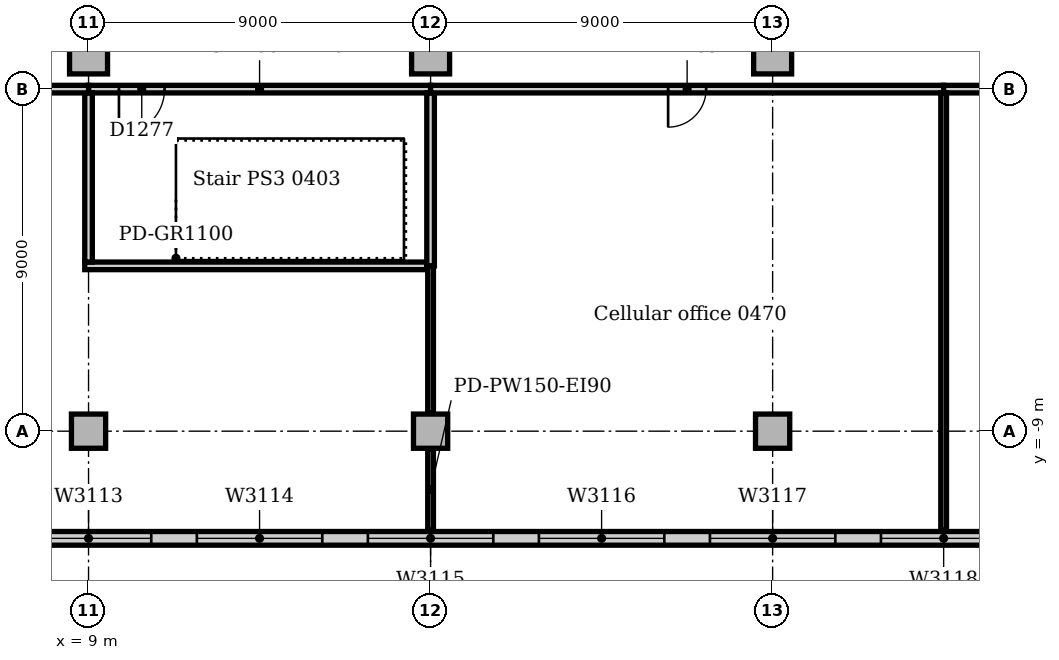
"""IFC4 building model, lengths in metres.
Left out: names, types, materials, properties, quantities, classifications, styles, units other than length and angle.
Written with IfcOpenShell. Run it as: python <this file> out.ifc"""

import sys

from ifc_helpers import new_model, si_unit, direction, frame, frame_2d, origin, origin_with_axes, origin_2d, place, context, subcontext, project, spatial, rectangle, extrude, element, fill, save


model = new_model("IFC4")
c1 = context("Model", 3, precision=1e-05, world=origin(), true_north=direction((0.0, 1.0)))
c2 = subcontext(c1, "Body", "Model", "MODEL_VIEW")
j1 = project(units=[si_unit("LENGTHUNIT", "METRE"), si_unit("PLANEANGLEUNIT", "RADIAN")], contexts=[c1])
p1 = place(None, origin())
s1 = spatial("IfcSite", under=j1, at=p1, CompositionType="ELEMENT")
p2 = place(p1, origin())
s2 = spatial("IfcBuilding", under=s1, at=p2, CompositionType="ELEMENT")
p3 = place(p2, frame((0.0, 0.0, 21.0)))
s3 = spatial("IfcBuildingStorey", under=s2, at=p3, CompositionType="ELEMENT", Elevation=21.0)
for number, where, z_axis, x_axis in (
    (1, (9.0, 0.9, 0.0), (0.0, 0.0, 1.0), (1.0, 0.0, 0.0)),
    (2, (18.0, 0.9, 0.0), (0.0, 0.0, 1.0), (1.0, 0.0, 0.0)),
    (3, (27.0, 0.9, 0.0), (0.0, 0.0, 1.0), (1.0, 0.0, 0.0)),
):
    element("IfcColumn", number, at=place(p3, frame(where, z_axis=z_axis, x_axis=x_axis)), inside=s3, PredefinedType="COLUMN", context=c2, shape_type="SweptSolid", body=[
        extrude(rectangle(XDim=1.0, YDim=1.0, at=origin_2d()), origin(), (0.0, 0.0, 1.0), 4.85),
    ])
for number, where, z_axis, x_axis in (
    (4, (9.0, -9.0, 0.0), (0.0, 0.0, 1.0), (1.0, 0.0, 0.0)),
    (5, (18.0, -9.0, 0.0), (0.0, 0.0, 1.0), (1.0, 0.0, 0.0)),
    (6, (27.0, -9.0, 0.0), (0.0, 0.0, 1.0), (1.0, 0.0, 0.0)),
):
    element("IfcColumn", number, at=place(p3, frame(where, z_axis=z_axis, x_axis=x_axis)), inside=s3, PredefinedType="COLUMN", context=c2, shape_type="SweptSolid", body=[
        extrude(rectangle(XDim=0.9, YDim=0.9, at=origin_2d()), origin(), (0.0, 0.0, 1.0), 4.7),
    ])
p4 = place(p3, frame((-81.0, -11.82, 0.0), z_axis=(0.0, 0.0, 1.0), x_axis=(1.0, 0.0, 0.0)))
e7 = element("IfcWall", 7, at=p4, inside=s3, PredefinedType="STANDARD", context=c2, shape_type="SweptSolid", body=[
    extrude(rectangle(XDim=144.0, YDim=0.36, at=frame_2d((72.0, 0.0))), origin(), (0.0, 0.0, 1.0), 4.85),
])
p5 = place(p4, frame((2.85, 0.0, 0.9)))
e8 = element("IfcOpeningElement", 8, at=p5, cuts=e7, PredefinedType="OPENING", context=c2, shape_type="SweptSolid", body=[
    extrude(rectangle(XDim=3.3, YDim=2.4, at=frame_2d((1.65, 1.2))), frame((0.0, 0.19, 0.0), z_axis=(0.0, -1.0, 0.0), x_axis=(1.0, 0.0, 0.0)), (0.0, 0.0, 1.0), 0.38),
])
p6 = place(p4, frame((7.35, 0.0, 0.9)))
e9 = element("IfcOpeningElement", 9, at=p6, cuts=e7, PredefinedType="OPENING", context=c2, shape_type="SweptSolid", body=[
    extrude(rectangle(XDim=3.3, YDim=2.4, at=frame_2d((1.65, 1.2))), frame((0.0, 0.19, 0.0), z_axis=(0.0, -1.0, 0.0), x_axis=(1.0, 0.0, 0.0)), (0.0, 0.0, 1.0), 0.38),
])
p7 = place(p4, frame((11.85, 0.0, 0.9)))
e10 = element("IfcOpeningElement", 10, at=p7, cuts=e7, PredefinedType="OPENING", context=c2, shape_type="SweptSolid", body=[
    extrude(rectangle(XDim=3.3, YDim=2.4, at=frame_2d((1.65, 1.2))), frame((0.0, 0.19, 0.0), z_axis=(0.0, -1.0, 0.0), x_axis=(1.0, 0.0, 0.0)), (0.0, 0.0, 1.0), 0.38),
])
p8 = place(p4, frame((16.35, 0.0, 0.9)))
e11 = element("IfcOpeningElement", 11, at=p8, cuts=e7, PredefinedType="OPENING", context=c2, shape_type="SweptSolid", body=[
    extrude(rectangle(XDim=3.3, YDim=2.4, at=frame_2d((1.65, 1.2))), frame((0.0, 0.19, 0.0), z_axis=(0.0, -1.0, 0.0), x_axis=(1.0, 0.0, 0.0)), (0.0, 0.0, 1.0), 0.38),
])
p9 = place(p4, frame((20.85, 0.0, 0.9)))
e12 = element("IfcOpeningElement", 12, at=p9, cuts=e7, PredefinedType="OPENING", context=c2, shape_type="SweptSolid", body=[
    extrude(rectangle(XDim=3.3, YDim=2.4, at=frame_2d((1.65, 1.2))), frame((0.0, 0.19, 0.0), z_axis=(0.0, -1.0, 0.0), x_axis=(1.0, 0.0, 0.0)), (0.0, 0.0, 1.0), 0.38),
])
p10 = place(p4, frame((25.35, 0.0, 0.9)))
e13 = element("IfcOpeningElement", 13, at=p10, cuts=e7, PredefinedType="OPENING", context=c2, shape_type="SweptSolid", body=[
    extrude(rectangle(XDim=3.3, YDim=2.4, at=frame_2d((1.65, 1.2))), frame((0.0, 0.19, 0.0), z_axis=(0.0, -1.0, 0.0), x_axis=(1.0, 0.0, 0.0)), (0.0, 0.0, 1.0), 0.38),
])
p11 = place(p4, frame((29.85, 0.0, 0.9)))
e14 = element("IfcOpeningElement", 14, at=p11, cuts=e7, PredefinedType="OPENING", context=c2, shape_type="SweptSolid", body=[
    extrude(rectangle(XDim=3.3, YDim=2.4, at=frame_2d((1.65, 1.2))), frame((0.0, 0.19, 0.0), z_axis=(0.0, -1.0, 0.0), x_axis=(1.0, 0.0, 0.0)), (0.0, 0.0, 1.0), 0.38),
])
p12 = place(p4, frame((34.35, 0.0, 0.9)))
e15 = element("IfcOpeningElement", 15, at=p12, cuts=e7, PredefinedType="OPENING", context=c2, shape_type="SweptSolid", body=[
    extrude(rectangle(XDim=3.3, YDim=2.4, at=frame_2d((1.65, 1.2))), frame((0.0, 0.19, 0.0), z_axis=(0.0, -1.0, 0.0), x_axis=(1.0, 0.0, 0.0)), (0.0, 0.0, 1.0), 0.38),
])
p13 = place(p4, frame((38.85, 0.0, 0.9)))
e16 = element("IfcOpeningElement", 16, at=p13, cuts=e7, PredefinedType="OPENING", context=c2, shape_type="SweptSolid", body=[
    extrude(rectangle(XDim=3.3, YDim=2.4, at=frame_2d((1.65, 1.2))), frame((0.0, 0.19, 0.0), z_axis=(0.0, -1.0, 0.0), x_axis=(1.0, 0.0, 0.0)), (0.0, 0.0, 1.0), 0.38),
])
p14 = place(p4, frame((43.35, 0.0, 0.9)))
e17 = element("IfcOpeningElement", 17, at=p14, cuts=e7, PredefinedType="OPENING", context=c2, shape_type="SweptSolid", body=[
    extrude(rectangle(XDim=3.3, YDim=2.4, at=frame_2d((1.65, 1.2))), frame((0.0, 0.19, 0.0), z_axis=(0.0, -1.0, 0.0), x_axis=(1.0, 0.0, 0.0)), (0.0, 0.0, 1.0), 0.38),
])
p15 = place(p4, frame((47.85, 0.0, 0.9)))
e18 = element("IfcOpeningElement", 18, at=p15, cuts=e7, PredefinedType="OPENING", context=c2, shape_type="SweptSolid", body=[
    extrude(rectangle(XDim=3.3, YDim=2.4, at=frame_2d((1.65, 1.2))), frame((0.0, 0.19, 0.0), z_axis=(0.0, -1.0, 0.0), x_axis=(1.0, 0.0, 0.0)), (0.0, 0.0, 1.0), 0.38),
])
p16 = place(p4, frame((52.35, 0.0, 0.9)))
e19 = element("IfcOpeningElement", 19, at=p16, cuts=e7, PredefinedType="OPENING", context=c2, shape_type="SweptSolid", body=[
    extrude(rectangle(XDim=3.3, YDim=2.4, at=frame_2d((1.65, 1.2))), frame((0.0, 0.19, 0.0), z_axis=(0.0, -1.0, 0.0), x_axis=(1.0, 0.0, 0.0)), (0.0, 0.0, 1.0), 0.38),
])
p17 = place(p4, frame((56.85, 0.0, 0.9)))
e20 = element("IfcOpeningElement", 20, at=p17, cuts=e7, PredefinedType="OPENING", context=c2, shape_type="SweptSolid", body=[
    extrude(rectangle(XDim=3.3, YDim=2.4, at=frame_2d((1.65, 1.2))), frame((0.0, 0.19, 0.0), z_axis=(0.0, -1.0, 0.0), x_axis=(1.0, 0.0, 0.0)), (0.0, 0.0, 1.0), 0.38),
])
p18 = place(p4, frame((61.35, 0.0, 0.9)))
e21 = element("IfcOpeningElement", 21, at=p18, cuts=e7, PredefinedType="OPENING", context=c2, shape_type="SweptSolid", body=[
    extrude(rectangle(XDim=3.3, YDim=2.4, at=frame_2d((1.65, 1.2))), frame((0.0, 0.19, 0.0), z_axis=(0.0, -1.0, 0.0), x_axis=(1.0, 0.0, 0.0)), (0.0, 0.0, 1.0), 0.38),
])
p19 = place(p4, frame((65.85, 0.0, 0.9)))
e22 = element("IfcOpeningElement", 22, at=p19, cuts=e7, PredefinedType="OPENING", context=c2, shape_type="SweptSolid", body=[
    extrude(rectangle(XDim=3.3, YDim=2.4, at=frame_2d((1.65, 1.2))), frame((0.0, 0.19, 0.0), z_axis=(0.0, -1.0, 0.0), x_axis=(1.0, 0.0, 0.0)), (0.0, 0.0, 1.0), 0.38),
])
p20 = place(p4, frame((70.35, 0.0, 0.9)))
e23 = element("IfcOpeningElement", 23, at=p20, cuts=e7, PredefinedType="OPENING", context=c2, shape_type="SweptSolid", body=[
    extrude(rectangle(XDim=3.3, YDim=2.4, at=frame_2d((1.65, 1.2))), frame((0.0, 0.19, 0.0), z_axis=(0.0, -1.0, 0.0), x_axis=(1.0, 0.0, 0.0)), (0.0, 0.0, 1.0), 0.38),
])
p21 = place(p4, frame((74.85, 0.0, 0.9)))
e24 = element("IfcOpeningElement", 24, at=p21, cuts=e7, PredefinedType="OPENING", context=c2, shape_type="SweptSolid", body=[
    extrude(rectangle(XDim=3.3, YDim=2.4, at=frame_2d((1.65, 1.2))), frame((0.0, 0.19, 0.0), z_axis=(0.0, -1.0, 0.0), x_axis=(1.0, 0.0, 0.0)), (0.0, 0.0, 1.0), 0.38),
])
p22 = place(p4, frame((79.35, 0.0, 0.9)))
e25 = element("IfcOpeningElement", 25, at=p22, cuts=e7, PredefinedType="OPENING", context=c2, shape_type="SweptSolid", body=[
    extrude(rectangle(XDim=3.3, YDim=2.4, at=frame_2d((1.65, 1.2))), frame((0.0, 0.19, 0.0), z_axis=(0.0, -1.0, 0.0), x_axis=(1.0, 0.0, 0.0)), (0.0, 0.0, 1.0), 0.38),
])
p23 = place(p4, frame((83.85, 0.0, 0.9)))
e26 = element("IfcOpeningElement", 26, at=p23, cuts=e7, PredefinedType="OPENING", context=c2, shape_type="SweptSolid", body=[
    extrude(rectangle(XDim=3.3, YDim=2.4, at=frame_2d((1.65, 1.2))), frame((0.0, 0.19, 0.0), z_axis=(0.0, -1.0, 0.0), x_axis=(1.0, 0.0, 0.0)), (0.0, 0.0, 1.0), 0.38),
])
p24 = place(p4, frame((88.35, 0.0, 0.9)))
e27 = element("IfcOpeningElement", 27, at=p24, cuts=e7, PredefinedType="OPENING", context=c2, shape_type="SweptSolid", body=[
    extrude(rectangle(XDim=3.3, YDim=2.4, at=frame_2d((1.65, 1.2))), frame((0.0, 0.19, 0.0), z_axis=(0.0, -1.0, 0.0), x_axis=(1.0, 0.0, 0.0)), (0.0, 0.0, 1.0), 0.38),
])
p25 = place(p4, frame((92.85, 0.0, 0.9)))
e28 = element("IfcOpeningElement", 28, at=p25, cuts=e7, PredefinedType="OPENING", context=c2, shape_type="SweptSolid", body=[
    extrude(rectangle(XDim=3.3, YDim=2.4, at=frame_2d((1.65, 1.2))), frame((0.0, 0.19, 0.0), z_axis=(0.0, -1.0, 0.0), x_axis=(1.0, 0.0, 0.0)), (0.0, 0.0, 1.0), 0.38),
])
p26 = place(p4, frame((97.35, 0.0, 0.9)))
e29 = element("IfcOpeningElement", 29, at=p26, cuts=e7, PredefinedType="OPENING", context=c2, shape_type="SweptSolid", body=[
    extrude(rectangle(XDim=3.3, YDim=2.4, at=frame_2d((1.65, 1.2))), frame((0.0, 0.19, 0.0), z_axis=(0.0, -1.0, 0.0), x_axis=(1.0, 0.0, 0.0)), (0.0, 0.0, 1.0), 0.38),
])
p27 = place(p4, frame((101.85, 0.0, 0.9)))
e30 = element("IfcOpeningElement", 30, at=p27, cuts=e7, PredefinedType="OPENING", context=c2, shape_type="SweptSolid", body=[
    extrude(rectangle(XDim=3.3, YDim=2.4, at=frame_2d((1.65, 1.2))), frame((0.0, 0.19, 0.0), z_axis=(0.0, -1.0, 0.0), x_axis=(1.0, 0.0, 0.0)), (0.0, 0.0, 1.0), 0.38),
])
p28 = place(p4, frame((106.35, 0.0, 0.9)))
e31 = element("IfcOpeningElement", 31, at=p28, cuts=e7, PredefinedType="OPENING", context=c2, shape_type="SweptSolid", body=[
    extrude(rectangle(XDim=3.3, YDim=2.4, at=frame_2d((1.65, 1.2))), frame((0.0, 0.19, 0.0), z_axis=(0.0, -1.0, 0.0), x_axis=(1.0, 0.0, 0.0)), (0.0, 0.0, 1.0), 0.38),
])
p29 = place(p4, frame((110.85, 0.0, 0.9)))
e32 = element("IfcOpeningElement", 32, at=p29, cuts=e7, PredefinedType="OPENING", context=c2, shape_type="SweptSolid", body=[
    extrude(rectangle(XDim=3.3, YDim=2.4, at=frame_2d((1.65, 1.2))), frame((0.0, 0.19, 0.0), z_axis=(0.0, -1.0, 0.0), x_axis=(1.0, 0.0, 0.0)), (0.0, 0.0, 1.0), 0.38),
])
p30 = place(p4, frame((115.35, 0.0, 0.9)))
e33 = element("IfcOpeningElement", 33, at=p30, cuts=e7, PredefinedType="OPENING", context=c2, shape_type="SweptSolid", body=[
    extrude(rectangle(XDim=3.3, YDim=2.4, at=frame_2d((1.65, 1.2))), frame((0.0, 0.19, 0.0), z_axis=(0.0, -1.0, 0.0), x_axis=(1.0, 0.0, 0.0)), (0.0, 0.0, 1.0), 0.38),
])
p31 = place(p4, frame((119.85, 0.0, 0.9)))
e34 = element("IfcOpeningElement", 34, at=p31, cuts=e7, PredefinedType="OPENING", context=c2, shape_type="SweptSolid", body=[
    extrude(rectangle(XDim=3.3, YDim=2.4, at=frame_2d((1.65, 1.2))), frame((0.0, 0.19, 0.0), z_axis=(0.0, -1.0, 0.0), x_axis=(1.0, 0.0, 0.0)), (0.0, 0.0, 1.0), 0.38),
])
p32 = place(p4, frame((124.35, 0.0, 0.9)))
e35 = element("IfcOpeningElement", 35, at=p32, cuts=e7, PredefinedType="OPENING", context=c2, shape_type="SweptSolid", body=[
    extrude(rectangle(XDim=3.3, YDim=2.4, at=frame_2d((1.65, 1.2))), frame((0.0, 0.19, 0.0), z_axis=(0.0, -1.0, 0.0), x_axis=(1.0, 0.0, 0.0)), (0.0, 0.0, 1.0), 0.38),
])
p33 = place(p4, frame((128.85, 0.0, 0.9)))
e36 = element("IfcOpeningElement", 36, at=p33, cuts=e7, PredefinedType="OPENING", context=c2, shape_type="SweptSolid", body=[
    extrude(rectangle(XDim=3.3, YDim=2.4, at=frame_2d((1.65, 1.2))), frame((0.0, 0.19, 0.0), z_axis=(0.0, -1.0, 0.0), x_axis=(1.0, 0.0, 0.0)), (0.0, 0.0, 1.0), 0.38),
])
p34 = place(p4, frame((133.35, 0.0, 0.9)))
e37 = element("IfcOpeningElement", 37, at=p34, cuts=e7, PredefinedType="OPENING", context=c2, shape_type="SweptSolid", body=[
    extrude(rectangle(XDim=3.3, YDim=2.4, at=frame_2d((1.65, 1.2))), frame((0.0, 0.19, 0.0), z_axis=(0.0, -1.0, 0.0), x_axis=(1.0, 0.0, 0.0)), (0.0, 0.0, 1.0), 0.38),
])
p35 = place(p4, frame((137.85, 0.0, 0.9)))
e38 = element("IfcOpeningElement", 38, at=p35, cuts=e7, PredefinedType="OPENING", context=c2, shape_type="SweptSolid", body=[
    extrude(rectangle(XDim=3.3, YDim=2.4, at=frame_2d((1.65, 1.2))), frame((0.0, 0.19, 0.0), z_axis=(0.0, -1.0, 0.0), x_axis=(1.0, 0.0, 0.0)), (0.0, 0.0, 1.0), 0.38),
])
p36 = place(p3, frame((9.0, 0.0, 0.0), z_axis=(0.0, 0.0, 1.0), x_axis=(1.0, 0.0, 0.0)))
e39 = element("IfcWall", 39, at=p36, inside=s3, PredefinedType="SOLIDWALL", context=c2, shape_type="SweptSolid", body=[
    extrude(rectangle(XDim=9.0, YDim=0.2, at=frame_2d((4.5, 0.0))), origin(), (0.0, 0.0, 1.0), 4.85),
])
p37 = place(p36, frame((0.8, 0.0, 0.0)))
e40 = element("IfcOpeningElement", 40, at=p37, cuts=e39, PredefinedType="OPENING", context=c2, shape_type="SweptSolid", body=[
    extrude(rectangle(XDim=1.2, YDim=2.1, at=frame_2d((0.6, 1.05))), frame((0.0, 0.11, 0.0), z_axis=(0.0, -1.0, 0.0), x_axis=(1.0, 0.0, 0.0)), (0.0, 0.0, 1.0), 0.22),
])
p38 = place(p3, frame((8.9, -4.65, 0.0), z_axis=(0.0, 0.0, 1.0), x_axis=(1.0, 0.0, 0.0)))
e41 = element("IfcWall", 41, at=p38, inside=s3, PredefinedType="SOLIDWALL", context=c2, shape_type="SweptSolid", body=[
    extrude(rectangle(XDim=9.0, YDim=0.2, at=frame_2d((4.5, 0.0))), origin(), (0.0, 0.0, 1.0), 4.7),
])
p39 = place(p3, frame((9.0, -4.55, 0.0), z_axis=(0.0, 0.0, 1.0), x_axis=(0.0, 1.0, 0.0)))
e42 = element("IfcWall", 42, at=p39, inside=s3, PredefinedType="SOLIDWALL", context=c2, shape_type="SweptSolid", body=[
    extrude(rectangle(XDim=4.45, YDim=0.2, at=frame_2d((2.225, 0.0))), origin(), (0.0, 0.0, 1.0), 4.7),
])
p40 = place(p3, frame((18.0, -4.65, 0.0), z_axis=(0.0, 0.0, 1.0), x_axis=(0.0, 1.0, 0.0)))
e43 = element("IfcWall", 43, at=p40, inside=s3, PredefinedType="SOLIDWALL", context=c2, shape_type="SweptSolid", body=[
    extrude(rectangle(XDim=4.55, YDim=0.2, at=frame_2d((2.275, 0.0))), origin(), (0.0, 0.0, 1.0), 4.7),
])
p41 = place(p3, origin_with_axes())
e44 = element("IfcWall", 44, at=p41, inside=s3, PredefinedType="PARTITIONING", context=c2, shape_type="SweptSolid", body=[
    extrude(rectangle(XDim=9.0, YDim=0.2, at=frame_2d((4.5, 0.0))), origin(), (0.0, 0.0, 1.0), 4.7),
])
p42 = place(p41, frame((4.3, 0.0, 0.0)))
e45 = element("IfcOpeningElement", 45, at=p42, cuts=e44, PredefinedType="OPENING", context=c2, shape_type="SweptSolid", body=[
    extrude(rectangle(XDim=1.0, YDim=2.1, at=frame_2d((0.5, 1.05))), frame((0.0, 0.11, 0.0), z_axis=(0.0, -1.0, 0.0), x_axis=(1.0, 0.0, 0.0)), (0.0, 0.0, 1.0), 0.22),
])
p43 = place(p3, frame((18.0, 0.0, 0.0), z_axis=(0.0, 0.0, 1.0), x_axis=(1.0, 0.0, 0.0)))
e46 = element("IfcWall", 46, at=p43, inside=s3, PredefinedType="PARTITIONING", context=c2, shape_type="SweptSolid", body=[
    extrude(rectangle(XDim=13.5, YDim=0.2, at=frame_2d((6.75, 0.0))), origin(), (0.0, 0.0, 1.0), 4.85),
])
p44 = place(p43, frame((6.25, 0.0, 0.0)))
e47 = element("IfcOpeningElement", 47, at=p44, cuts=e46, PredefinedType="OPENING", context=c2, shape_type="SweptSolid", body=[
    extrude(rectangle(XDim=1.0, YDim=2.1, at=frame_2d((0.5, 1.05))), frame((0.0, 0.11, 0.0), z_axis=(0.0, -1.0, 0.0), x_axis=(1.0, 0.0, 0.0)), (0.0, 0.0, 1.0), 0.22),
])
p45 = place(p3, frame((31.5, 0.0, 0.0), z_axis=(0.0, 0.0, 1.0), x_axis=(1.0, 0.0, 0.0)))
e48 = element("IfcWall", 48, at=p45, inside=s3, PredefinedType="PARTITIONING", context=c2, shape_type="SweptSolid", body=[
    extrude(rectangle(XDim=13.5, YDim=0.2, at=frame_2d((6.75, 0.0))), origin(), (0.0, 0.0, 1.0), 4.85),
])
p46 = place(p45, frame((6.25, 0.0, 0.0)))
e49 = element("IfcOpeningElement", 49, at=p46, cuts=e48, PredefinedType="OPENING", context=c2, shape_type="SweptSolid", body=[
    extrude(rectangle(XDim=1.0, YDim=2.1, at=frame_2d((0.5, 1.05))), frame((0.0, 0.11, 0.0), z_axis=(0.0, -1.0, 0.0), x_axis=(1.0, 0.0, 0.0)), (0.0, 0.0, 1.0), 0.22),
])
p47 = place(p3, frame((18.0, -11.6, 0.0), z_axis=(0.0, 0.0, 1.0), x_axis=(0.0, 1.0, 0.0)))
e50 = element("IfcWall", 50, at=p47, inside=s3, PredefinedType="PARTITIONING", context=c2, shape_type="SweptSolid", body=[
    extrude(rectangle(XDim=2.13, YDim=0.15, at=frame_2d((1.065, 0.0))), origin(), (0.0, 0.0, 1.0), 4.7),
])
p48 = place(p3, frame((18.0, -8.53, 0.0), z_axis=(0.0, 0.0, 1.0), x_axis=(0.0, 1.0, 0.0)))
e51 = element("IfcWall", 51, at=p48, inside=s3, PredefinedType="PARTITIONING", context=c2, shape_type="SweptSolid", body=[
    extrude(rectangle(XDim=3.88, YDim=0.15, at=frame_2d((1.94, 0.0))), origin(), (0.0, 0.0, 1.0), 4.7),
])
p49 = place(p3, frame((31.5, -11.6, 0.0), z_axis=(0.0, 0.0, 1.0), x_axis=(0.0, 1.0, 0.0)))
e52 = element("IfcWall", 52, at=p49, inside=s3, PredefinedType="PARTITIONING", context=c2, shape_type="SweptSolid", body=[
    extrude(rectangle(XDim=11.5, YDim=0.15, at=frame_2d((5.75, 0.0))), origin(), (0.0, 0.0, 1.0), 4.7),
])
p50 = place(p24, origin())
e53 = element("IfcWindow", 53, at=p50, inside=s3, PartitioningType="SINGLE_PANEL", PredefinedType="WINDOW", context=c2, shape_type="SweptSolid", body=[
    extrude(rectangle(XDim=3.3, YDim=2.4, at=frame_2d((1.65, 1.2))), frame((0.0, 0.13, 0.0), z_axis=(0.0, -1.0, 0.0), x_axis=(1.0, 0.0, 0.0)), (0.0, 0.0, 1.0), 0.06),
])
fill(e27, e53)
p51 = place(p25, origin())
e54 = element("IfcWindow", 54, at=p51, inside=s3, PartitioningType="SINGLE_PANEL", PredefinedType="WINDOW", context=c2, shape_type="SweptSolid", body=[
    extrude(rectangle(XDim=3.3, YDim=2.4, at=frame_2d((1.65, 1.2))), frame((0.0, 0.13, 0.0), z_axis=(0.0, -1.0, 0.0), x_axis=(1.0, 0.0, 0.0)), (0.0, 0.0, 1.0), 0.06),
])
fill(e28, e54)
p52 = place(p26, origin())
e55 = element("IfcWindow", 55, at=p52, inside=s3, PartitioningType="SINGLE_PANEL", PredefinedType="WINDOW", context=c2, shape_type="SweptSolid", body=[
    extrude(rectangle(XDim=3.3, YDim=2.4, at=frame_2d((1.65, 1.2))), frame((0.0, 0.13, 0.0), z_axis=(0.0, -1.0, 0.0), x_axis=(1.0, 0.0, 0.0)), (0.0, 0.0, 1.0), 0.06),
])
fill(e29, e55)
p53 = place(p27, origin())
e56 = element("IfcWindow", 56, at=p53, inside=s3, PartitioningType="SINGLE_PANEL", PredefinedType="WINDOW", context=c2, shape_type="SweptSolid", body=[
    extrude(rectangle(XDim=3.3, YDim=2.4, at=frame_2d((1.65, 1.2))), frame((0.0, 0.13, 0.0), z_axis=(0.0, -1.0, 0.0), x_axis=(1.0, 0.0, 0.0)), (0.0, 0.0, 1.0), 0.06),
])
fill(e30, e56)
p54 = place(p28, origin())
e57 = element("IfcWindow", 57, at=p54, inside=s3, PartitioningType="SINGLE_PANEL", PredefinedType="WINDOW", context=c2, shape_type="SweptSolid", body=[
    extrude(rectangle(XDim=3.3, YDim=2.4, at=frame_2d((1.65, 1.2))), frame((0.0, 0.13, 0.0), z_axis=(0.0, -1.0, 0.0), x_axis=(1.0, 0.0, 0.0)), (0.0, 0.0, 1.0), 0.06),
])
fill(e31, e57)
p55 = place(p29, origin())
e58 = element("IfcWindow", 58, at=p55, inside=s3, PartitioningType="SINGLE_PANEL", PredefinedType="WINDOW", context=c2, shape_type="SweptSolid", body=[
    extrude(rectangle(XDim=3.3, YDim=2.4, at=frame_2d((1.65, 1.2))), frame((0.0, 0.13, 0.0), z_axis=(0.0, -1.0, 0.0), x_axis=(1.0, 0.0, 0.0)), (0.0, 0.0, 1.0), 0.06),
])
fill(e32, e58)
p56 = place(p44, frame((1.0, 0.0, 0.0), z_axis=(0.0, 0.0, 1.0), x_axis=(-1.0, 0.0, 0.0)))
e59 = element("IfcDoor", 59, at=p56, inside=s3, OperationType="SINGLE_SWING_RIGHT", PredefinedType="DOOR", context=c2, shape_type="SweptSolid", body=[
    extrude(rectangle(XDim=1.0, YDim=2.1, at=frame_2d((0.5, 1.05))), frame((0.0, 0.025, 0.0), z_axis=(0.0, -1.0, 0.0), x_axis=(1.0, 0.0, 0.0)), (0.0, 0.0, 1.0), 0.05),
])
fill(e47, e59)
p57 = place(p37, frame((1.2, 0.0, 0.0), z_axis=(0.0, 0.0, 1.0), x_axis=(-1.0, 0.0, 0.0)))
e60 = element("IfcDoor", 60, at=p57, inside=s3, OperationType="SINGLE_SWING_RIGHT", PredefinedType="DOOR", context=c2, shape_type="SweptSolid", body=[
    extrude(rectangle(XDim=1.2, YDim=2.1, at=frame_2d((0.6, 1.05))), frame((0.0, 0.025, 0.0), z_axis=(0.0, -1.0, 0.0), x_axis=(1.0, 0.0, 0.0)), (0.0, 0.0, 1.0), 0.05),
])
fill(e40, e60)
save(model, sys.argv[1])
